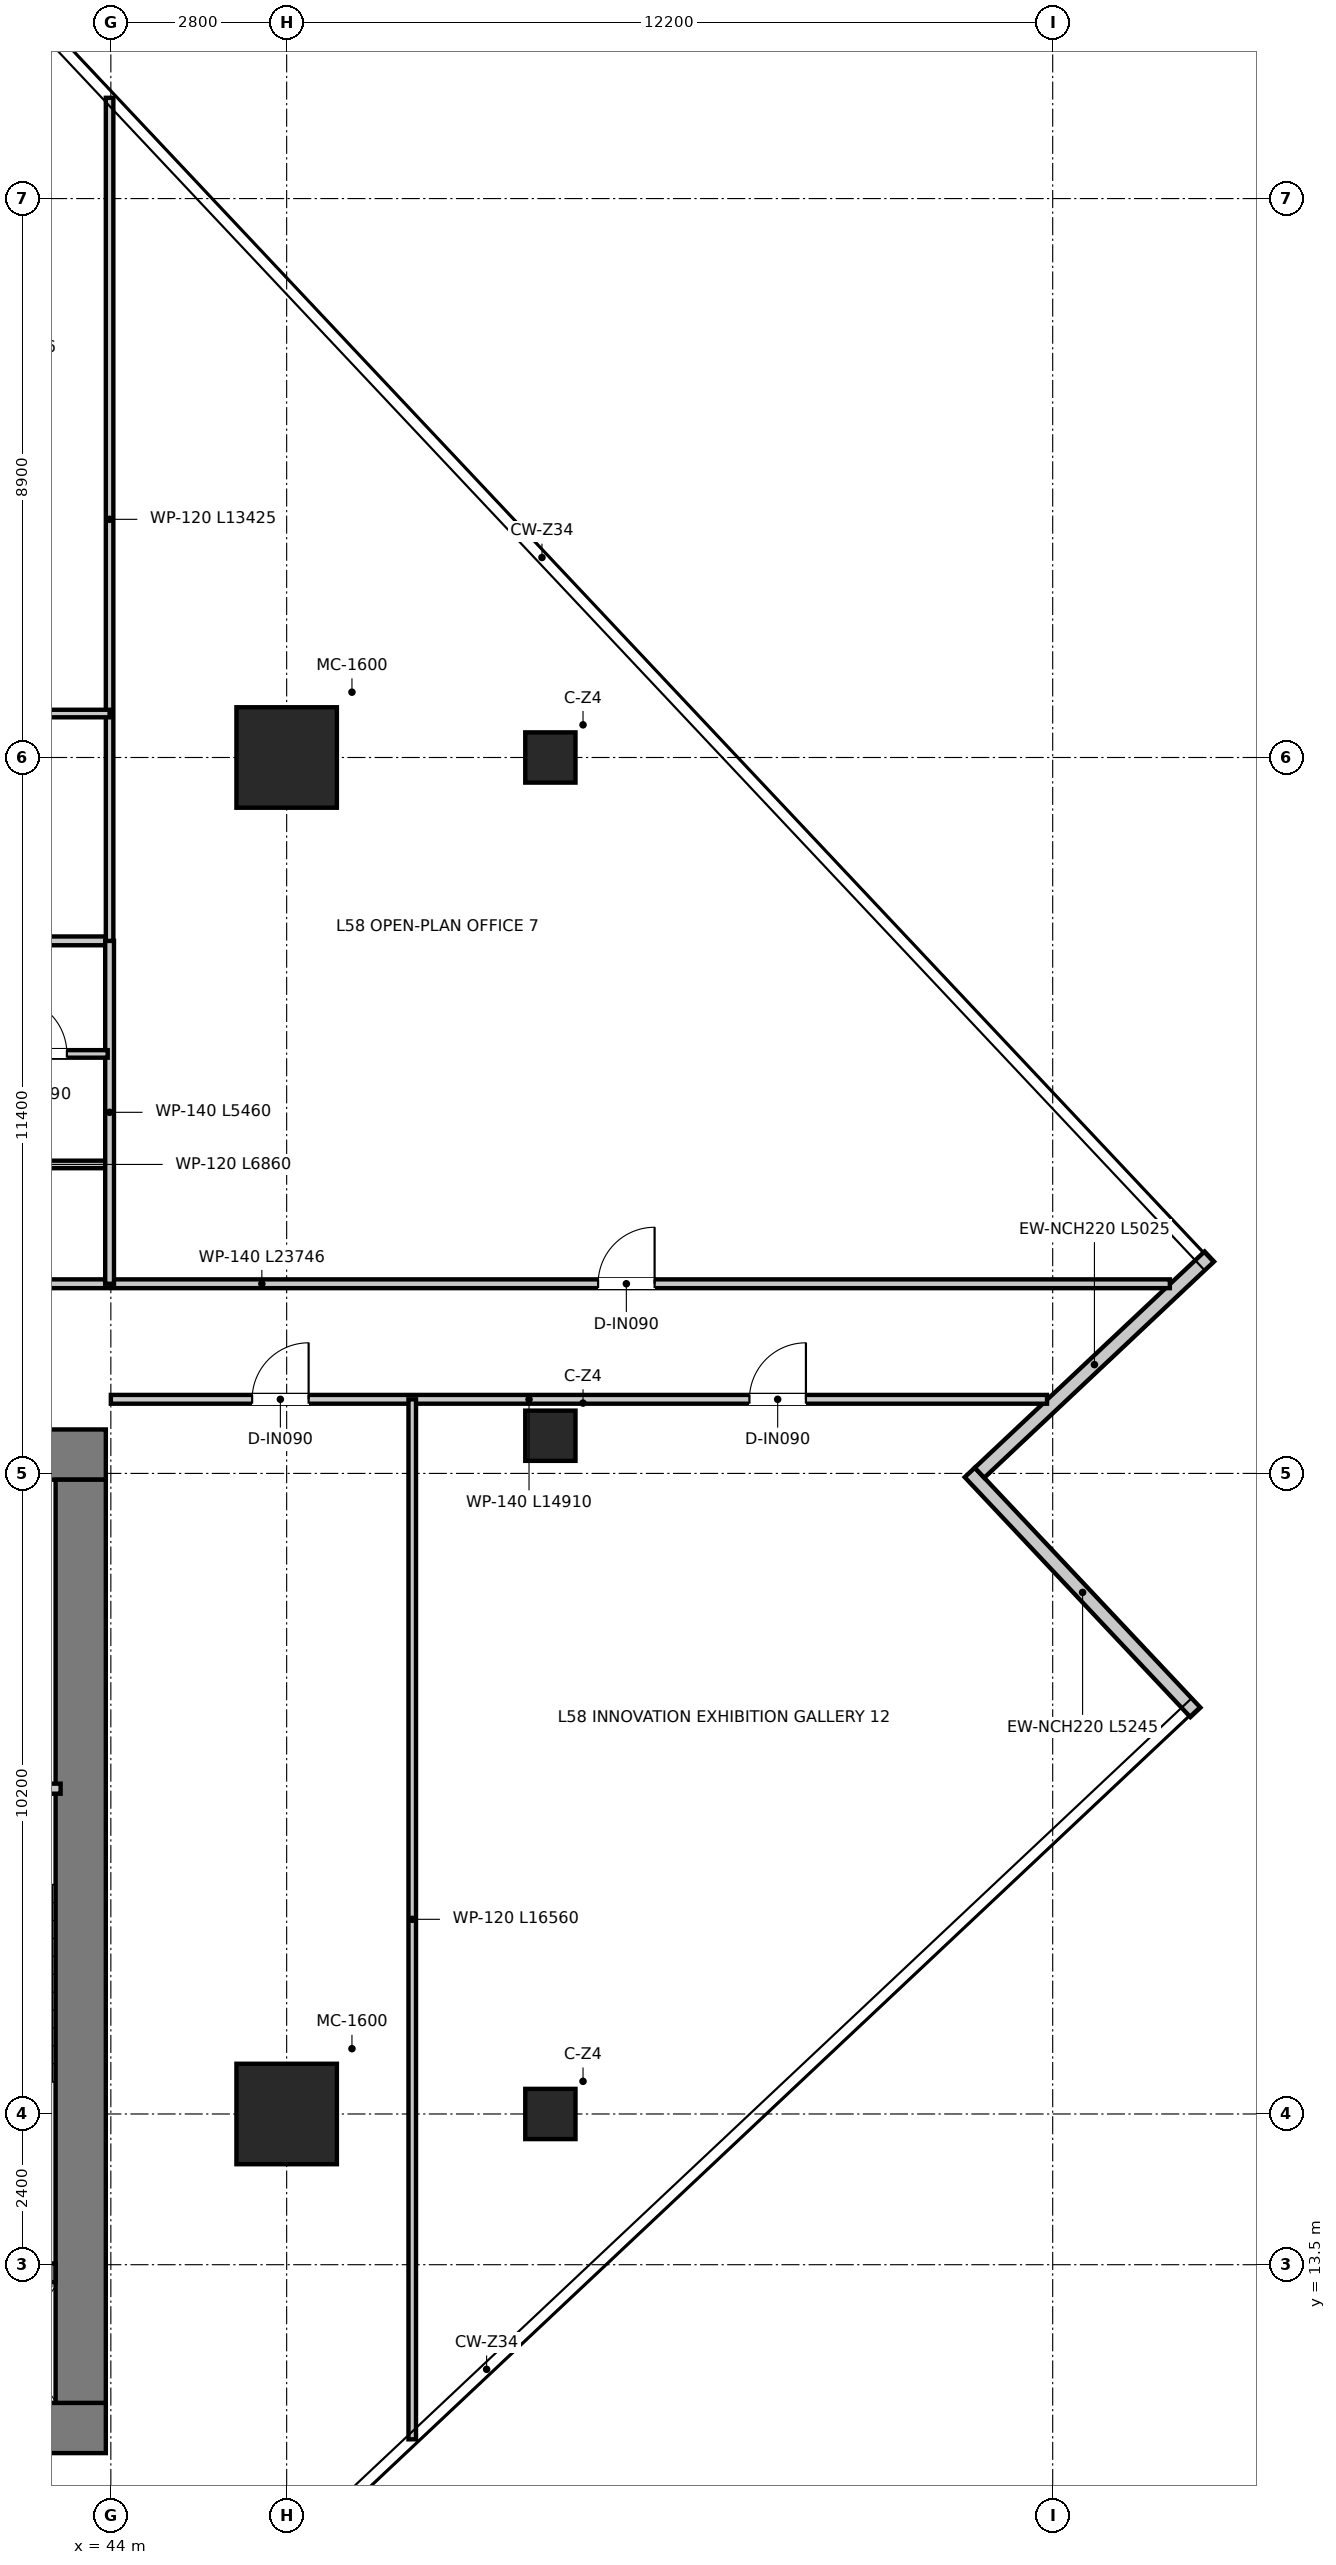
"""IFC4 building model, lengths in metres.
Left out: names, types, materials, properties, quantities, classifications, styles, units other than length and angle.
Written with IfcOpenShell. Run it as: python <this file> out.ifc"""

import sys

from ifc_helpers import new_model, si_unit, direction, frame, frame_2d, origin, origin_2d, place, context, subcontext, project, spatial, rectangle, extrude, source, transform, mapped, element, fill, save


model = new_model("IFC4")
c1 = context("Model", 3, precision=1e-05, world=origin(), true_north=direction((0.0, 1.0)))
c2 = subcontext(c1, "Body", "Model", "MODEL_VIEW")
j1 = project(units=[si_unit("LENGTHUNIT", "METRE"), si_unit("PLANEANGLEUNIT", "RADIAN")], contexts=[c1])
p1 = place(None, origin())
s1 = spatial("IfcSite", under=j1, at=p1, CompositionType="ELEMENT")
p2 = place(p1, origin())
s2 = spatial("IfcBuilding", under=s1, at=p2, CompositionType="ELEMENT")
p3 = place(p2, frame((0.0, 0.0, 238.9)))
s3 = spatial("IfcBuildingStorey", under=s2, at=p3, CompositionType="ELEMENT", Elevation=238.9)
p4 = place(p3, frame((28.08, 10.9, 0.0), z_axis=(0.0, 0.0, 1.0), x_axis=(1.0, 0.0, 0.0)))
e1 = element("IfcWall", 1, at=p4, inside=s3, PredefinedType="SHEAR", context=c2, shape_type="SweptSolid", body=[
    extrude(rectangle(XDim=15.84, YDim=0.8, at=frame_2d((7.92, 0.0))), origin(), (0.0, 0.0, 1.0), 3.95),
])
p5 = place(p3, frame((28.08, 26.4, 0.0), z_axis=(0.0, 0.0, 1.0), x_axis=(1.0, 0.0, 0.0)))
e2 = element("IfcWall", 2, at=p5, inside=s3, PredefinedType="SHEAR", context=c2, shape_type="SweptSolid", body=[
    extrude(rectangle(XDim=15.84, YDim=0.8, at=frame_2d((7.92, 0.0))), origin(), (0.0, 0.0, 1.0), 3.95),
])
p6 = place(p5, frame((7.22, 0.0, 0.0)))
e3 = element("IfcOpeningElement", 3, at=p6, cuts=e2, PredefinedType="OPENING", context=c2, shape_type="SweptSolid", body=[
    extrude(rectangle(XDim=1.4, YDim=2.2, at=frame_2d((0.7, 1.1))), frame((0.0, 0.41, 0.0), z_axis=(0.0, -1.0, 0.0), x_axis=(1.0, 0.0, 0.0)), (0.0, 0.0, 1.0), 0.82),
])
p7 = place(p5, frame((1.775, 0.0, 0.0)))
e4 = element("IfcOpeningElement", 4, at=p7, cuts=e2, PredefinedType="OPENING", context=c2, shape_type="SweptSolid", body=[
    extrude(rectangle(XDim=1.05, YDim=2.1, at=frame_2d((0.525, 1.05))), frame((0.0, 0.41, 0.0), z_axis=(0.0, -1.0, 0.0), x_axis=(1.0, 0.0, 0.0)), (0.0, 0.0, 1.0), 0.82),
])
p8 = place(p5, frame((13.015, 0.0, 0.0)))
e5 = element("IfcOpeningElement", 5, at=p8, cuts=e2, PredefinedType="OPENING", context=c2, shape_type="SweptSolid", body=[
    extrude(rectangle(XDim=1.05, YDim=2.1, at=frame_2d((0.525, 1.05))), frame((0.0, 0.41, 0.0), z_axis=(0.0, -1.0, 0.0), x_axis=(1.0, 0.0, 0.0)), (0.0, 0.0, 1.0), 0.82),
])
p9 = place(p3, frame((43.52, 11.3, 0.0), z_axis=(0.0, 0.0, 1.0), x_axis=(0.0, 1.0, 0.0)))
e6 = element("IfcWall", 6, at=p9, inside=s3, PredefinedType="SHEAR", context=c2, shape_type="SweptSolid", body=[
    extrude(rectangle(XDim=14.7, YDim=0.8, at=frame_2d((7.35, 0.0))), origin(), (0.0, 0.0, 1.0), 3.95),
])
p10 = place(p3, frame((40.02, 13.37, 0.0), z_axis=(0.0, 0.0, 1.0), x_axis=(1.0, 0.0, 0.0)))
e7 = element("IfcWall", 7, at=p10, inside=s3, PredefinedType="SHEAR", context=c2, shape_type="SweptSolid", body=[
    extrude(rectangle(XDim=3.1, YDim=0.3, at=frame_2d((1.55, 0.0))), origin(), (0.0, 0.0, 1.0), 3.95),
])
m1 = source(origin(), c2, "Body", "SweptSolid", [
    extrude(rectangle(XDim=1.6, YDim=1.6, at=origin_2d()), origin(), (0.0, 0.0, 1.0), 3.95),
])
for number, where, z_axis, x_axis in (
    (8, (46.8, 15.9, 0.0), (0.0, 0.0, 1.0), (1.0, 0.0, 0.0)),
    (9, (46.8, 37.5, 0.0), (0.0, 0.0, 1.0), (1.0, 0.0, 0.0)),
):
    element("IfcColumn", number, at=place(p3, frame(where, z_axis=z_axis, x_axis=x_axis)), inside=s3, PredefinedType="USERDEFINED", context=c2, shape_type="MappedRepresentation", body=[
        mapped(m1, transform((0.0, 0.0, 0.0), x_axis=(1.0, 0.0, 0.0), y_axis=(0.0, 1.0, 0.0), z_axis=(0.0, 0.0, 1.0), scale=1.0)),
    ])
m2 = source(origin(), c2, "Body", "SweptSolid", [
    extrude(rectangle(XDim=0.8, YDim=0.8, at=origin_2d()), origin(), (0.0, 0.0, 1.0), 3.95),
])
for number, where, z_axis, x_axis in (
    (10, (51.0, 37.5, 0.0), (0.0, 0.0, 1.0), (1.0, 0.0, 0.0)),
    (11, (51.0, 26.7, 0.0), (0.0, 0.0, 1.0), (1.0, 0.0, 0.0)),
    (12, (51.0, 15.9, 0.0), (0.0, 0.0, 1.0), (1.0, 0.0, 0.0)),
):
    element("IfcColumn", number, at=place(p3, frame(where, z_axis=z_axis, x_axis=x_axis)), inside=s3, PredefinedType="COLUMN", context=c2, shape_type="MappedRepresentation", body=[
        mapped(m2, transform((0.0, 0.0, 0.0), x_axis=(1.0, 0.0, 0.0), y_axis=(0.0, 1.0, 0.0), z_axis=(0.0, 0.0, 1.0), scale=1.0)),
    ])
p11 = place(p3, frame((61.273, 22.295, 0.0), z_axis=(0.0, 0.0, 1.0), x_axis=(-0.685178828418, 0.728374884992, 0.0)))
e13 = element("IfcWall", 13, at=p11, inside=s3, PredefinedType="ELEMENTEDWALL", context=c2, shape_type="SweptSolid", body=[
    extrude(rectangle(XDim=5.245, YDim=0.22, at=frame_2d((2.623, 0.0))), origin(), (0.0, 0.0, 1.0), 3.67),
])
p12 = place(p3, frame((57.835, 26.111, 0.0), z_axis=(0.0, 0.0, 1.0), x_axis=(0.728372554527, 0.685181305796, 0.0)))
e14 = element("IfcWall", 14, at=p12, inside=s3, PredefinedType="ELEMENTEDWALL", context=c2, shape_type="SweptSolid", body=[
    extrude(rectangle(XDim=5.025, YDim=0.22, at=frame_2d((2.513, 0.0))), origin(), (0.0, 0.0, 1.0), 3.67),
])
p13 = place(p3, frame((40.04, 21.08, 0.0), z_axis=(0.0, 0.0, 1.0), x_axis=(1.0, 0.0, 0.0)))
e15 = element("IfcWall", 15, at=p13, inside=s3, PredefinedType="PARTITIONING", context=c2, shape_type="SweptSolid", body=[
    extrude(rectangle(XDim=3.16, YDim=0.16, at=frame_2d((1.58, 0.0))), origin(), (0.0, 0.0, 1.0), 3.67),
])
p14 = place(p13, frame((1.055, 0.0, 0.0)))
e16 = element("IfcOpeningElement", 16, at=p14, cuts=e15, PredefinedType="OPENING", context=c2, shape_type="SweptSolid", body=[
    extrude(rectangle(XDim=1.05, YDim=2.1, at=frame_2d((0.525, 1.05))), frame((0.0, 0.09, 0.0), z_axis=(0.0, -1.0, 0.0), x_axis=(1.0, 0.0, 0.0)), (0.0, 0.0, 1.0), 0.18),
])
p15 = place(p3, frame((37.12, 29.12, 0.0), z_axis=(0.0, 0.0, 1.0), x_axis=(1.0, 0.0, 0.0)))
e17 = element("IfcWall", 17, at=p15, inside=s3, PredefinedType="PARTITIONING", context=c2, shape_type="SweptSolid", body=[
    extrude(rectangle(XDim=23.746, YDim=0.14, at=frame_2d((11.873, 0.0))), origin(), (0.0, 0.0, 1.0), 3.03),
])
p16 = place(p15, frame((3.03, 0.0, 0.0)))
e18 = element("IfcOpeningElement", 18, at=p16, cuts=e17, PredefinedType="OPENING", context=c2, shape_type="SweptSolid", body=[
    extrude(rectangle(XDim=0.9, YDim=2.1, at=frame_2d((0.45, 1.05))), frame((0.0, 0.08, 0.0), z_axis=(0.0, -1.0, 0.0), x_axis=(1.0, 0.0, 0.0)), (0.0, 0.0, 1.0), 0.16),
])
p17 = place(p15, frame((14.64, 0.0, 0.0)))
e19 = element("IfcOpeningElement", 19, at=p17, cuts=e17, PredefinedType="OPENING", context=c2, shape_type="SweptSolid", body=[
    extrude(rectangle(XDim=0.9, YDim=2.1, at=frame_2d((0.45, 1.05))), frame((0.0, 0.08, 0.0), z_axis=(0.0, -1.0, 0.0), x_axis=(1.0, 0.0, 0.0)), (0.0, 0.0, 1.0), 0.16),
])
p18 = place(p3, frame((44.0, 27.28, 0.0), z_axis=(0.0, 0.0, 1.0), x_axis=(1.0, 0.0, 0.0)))
e20 = element("IfcWall", 20, at=p18, inside=s3, PredefinedType="PARTITIONING", context=c2, shape_type="SweptSolid", body=[
    extrude(rectangle(XDim=14.91, YDim=0.14, at=frame_2d((7.455, 0.0))), origin(), (0.0, 0.0, 1.0), 3.03),
])
p19 = place(p18, frame((2.25, 0.0, 0.0)))
e21 = element("IfcOpeningElement", 21, at=p19, cuts=e20, PredefinedType="OPENING", context=c2, shape_type="SweptSolid", body=[
    extrude(rectangle(XDim=0.9, YDim=2.1, at=frame_2d((0.45, 1.05))), frame((0.0, 0.08, 0.0), z_axis=(0.0, -1.0, 0.0), x_axis=(1.0, 0.0, 0.0)), (0.0, 0.0, 1.0), 0.16),
])
p20 = place(p18, frame((10.17, 0.0, 0.0)))
e22 = element("IfcOpeningElement", 22, at=p20, cuts=e20, PredefinedType="OPENING", context=c2, shape_type="SweptSolid", body=[
    extrude(rectangle(XDim=0.9, YDim=2.1, at=frame_2d((0.45, 1.05))), frame((0.0, 0.08, 0.0), z_axis=(0.0, -1.0, 0.0), x_axis=(1.0, 0.0, 0.0)), (0.0, 0.0, 1.0), 0.16),
])
p21 = place(p3, frame((37.12, 31.02, 0.0), z_axis=(0.0, 0.0, 1.0), x_axis=(1.0, 0.0, 0.0)))
e23 = element("IfcWall", 23, at=p21, inside=s3, PredefinedType="PARTITIONING", context=c2, shape_type="SweptSolid", body=[
    extrude(rectangle(XDim=6.86, YDim=0.12, at=frame_2d((3.43, 0.0))), origin(), (0.0, 0.0, 1.0), 3.18),
])
p22 = place(p3, frame((37.12, 34.58, 0.0), z_axis=(0.0, 0.0, 1.0), x_axis=(1.0, 0.0, 0.0)))
e24 = element("IfcWall", 24, at=p22, inside=s3, PredefinedType="PARTITIONING", context=c2, shape_type="SweptSolid", body=[
    extrude(rectangle(XDim=6.86, YDim=0.14, at=frame_2d((3.43, 0.0))), origin(), (0.0, 0.0, 1.0), 3.18),
])
p23 = place(p3, frame((43.98, 29.12, 0.0), z_axis=(0.0, 0.0, 1.0), x_axis=(0.0, 1.0, 0.0)))
e25 = element("IfcWall", 25, at=p23, inside=s3, PredefinedType="PARTITIONING", context=c2, shape_type="SweptSolid", body=[
    extrude(rectangle(XDim=5.46, YDim=0.14, at=frame_2d((2.73, 0.0))), origin(), (0.0, 0.0, 1.0), 3.37),
])
p24 = place(p3, frame((37.15, 32.78, 0.0), z_axis=(0.0, 0.0, 1.0), x_axis=(1.0, 0.0, 0.0)))
e26 = element("IfcWall", 26, at=p24, inside=s3, PredefinedType="PARTITIONING", context=c2, shape_type="SweptSolid", body=[
    extrude(rectangle(XDim=6.8, YDim=0.12, at=frame_2d((3.4, 0.0))), origin(), (0.0, 0.0, 1.0), 3.18),
])
p25 = place(p24, frame((0.725, 0.0, 0.0)))
e27 = element("IfcOpeningElement", 27, at=p25, cuts=e26, PredefinedType="OPENING", context=c2, shape_type="SweptSolid", body=[
    extrude(rectangle(XDim=0.85, YDim=2.1, at=frame_2d((0.425, 1.05))), frame((0.0, 0.07, 0.0), z_axis=(0.0, -1.0, 0.0), x_axis=(1.0, 0.0, 0.0)), (0.0, 0.0, 1.0), 0.14),
])
p26 = place(p24, frame((3.065, 0.0, 0.0)))
e28 = element("IfcOpeningElement", 28, at=p26, cuts=e26, PredefinedType="OPENING", context=c2, shape_type="SweptSolid", body=[
    extrude(rectangle(XDim=0.85, YDim=2.1, at=frame_2d((0.425, 1.05))), frame((0.0, 0.07, 0.0), z_axis=(0.0, -1.0, 0.0), x_axis=(1.0, 0.0, 0.0)), (0.0, 0.0, 1.0), 0.14),
])
p27 = place(p24, frame((5.25, 0.0, 0.0)))
e29 = element("IfcOpeningElement", 29, at=p27, cuts=e26, PredefinedType="OPENING", context=c2, shape_type="SweptSolid", body=[
    extrude(rectangle(XDim=0.9, YDim=2.1, at=frame_2d((0.45, 1.05))), frame((0.0, 0.07, 0.0), z_axis=(0.0, -1.0, 0.0), x_axis=(1.0, 0.0, 0.0)), (0.0, 0.0, 1.0), 0.14),
])
p28 = place(p3, frame((43.98, 34.58, 0.0), z_axis=(0.0, 0.0, 1.0), x_axis=(0.0, 1.0, 0.0)))
e30 = element("IfcWall", 30, at=p28, inside=s3, PredefinedType="PARTITIONING", context=c2, shape_type="SweptSolid", body=[
    extrude(rectangle(XDim=13.425, YDim=0.12, at=frame_2d((6.712, 0.0))), origin(), (0.0, 0.0, 1.0), 3.03),
])
p29 = place(p3, frame((37.12, 38.2, 0.0), z_axis=(0.0, 0.0, 1.0), x_axis=(1.0, 0.0, 0.0)))
e31 = element("IfcWall", 31, at=p29, inside=s3, PredefinedType="PARTITIONING", context=c2, shape_type="SweptSolid", body=[
    extrude(rectangle(XDim=6.86, YDim=0.12, at=frame_2d((3.43, 0.0))), origin(), (0.0, 0.0, 1.0), 3.18),
])
p30 = place(p3, frame((48.8, 10.719, 0.0), z_axis=(0.0, 0.0, 1.0), x_axis=(0.0, 1.0, 0.0)))
e32 = element("IfcWall", 32, at=p30, inside=s3, PredefinedType="PARTITIONING", context=c2, shape_type="SweptSolid", body=[
    extrude(rectangle(XDim=16.561, YDim=0.12, at=frame_2d((8.28, 0.0))), origin(), (0.0, 0.0, 1.0), 3.18),
])
p31 = place(p27, origin())
e33 = element("IfcDoor", 33, at=p31, inside=s3, OperationType="SINGLE_SWING_LEFT", PredefinedType="DOOR", context=c2, shape_type="SweptSolid", body=[
    extrude(rectangle(XDim=0.9, YDim=2.1, at=frame_2d((0.45, 1.05))), frame((0.0, 0.025, 0.0), z_axis=(0.0, -1.0, 0.0), x_axis=(1.0, 0.0, 0.0)), (0.0, 0.0, 1.0), 0.05),
])
fill(e29, e33)
p32 = place(p17, origin())
e34 = element("IfcDoor", 34, at=p32, inside=s3, OperationType="SINGLE_SWING_RIGHT", PredefinedType="DOOR", context=c2, shape_type="SweptSolid", body=[
    extrude(rectangle(XDim=0.9, YDim=2.1, at=frame_2d((0.45, 1.05))), frame((0.0, 0.025, 0.0), z_axis=(0.0, -1.0, 0.0), x_axis=(1.0, 0.0, 0.0)), (0.0, 0.0, 1.0), 0.05),
])
fill(e19, e34)
p33 = place(p19, origin())
e35 = element("IfcDoor", 35, at=p33, inside=s3, OperationType="SINGLE_SWING_RIGHT", PredefinedType="DOOR", context=c2, shape_type="SweptSolid", body=[
    extrude(rectangle(XDim=0.9, YDim=2.1, at=frame_2d((0.45, 1.05))), frame((0.0, 0.025, 0.0), z_axis=(0.0, -1.0, 0.0), x_axis=(1.0, 0.0, 0.0)), (0.0, 0.0, 1.0), 0.05),
])
fill(e21, e35)
p34 = place(p20, origin())
e36 = element("IfcDoor", 36, at=p34, inside=s3, OperationType="SINGLE_SWING_RIGHT", PredefinedType="DOOR", context=c2, shape_type="SweptSolid", body=[
    extrude(rectangle(XDim=0.9, YDim=2.1, at=frame_2d((0.45, 1.05))), frame((0.0, 0.025, 0.0), z_axis=(0.0, -1.0, 0.0), x_axis=(1.0, 0.0, 0.0)), (0.0, 0.0, 1.0), 0.05),
])
fill(e22, e36)
save(model, sys.argv[1])
